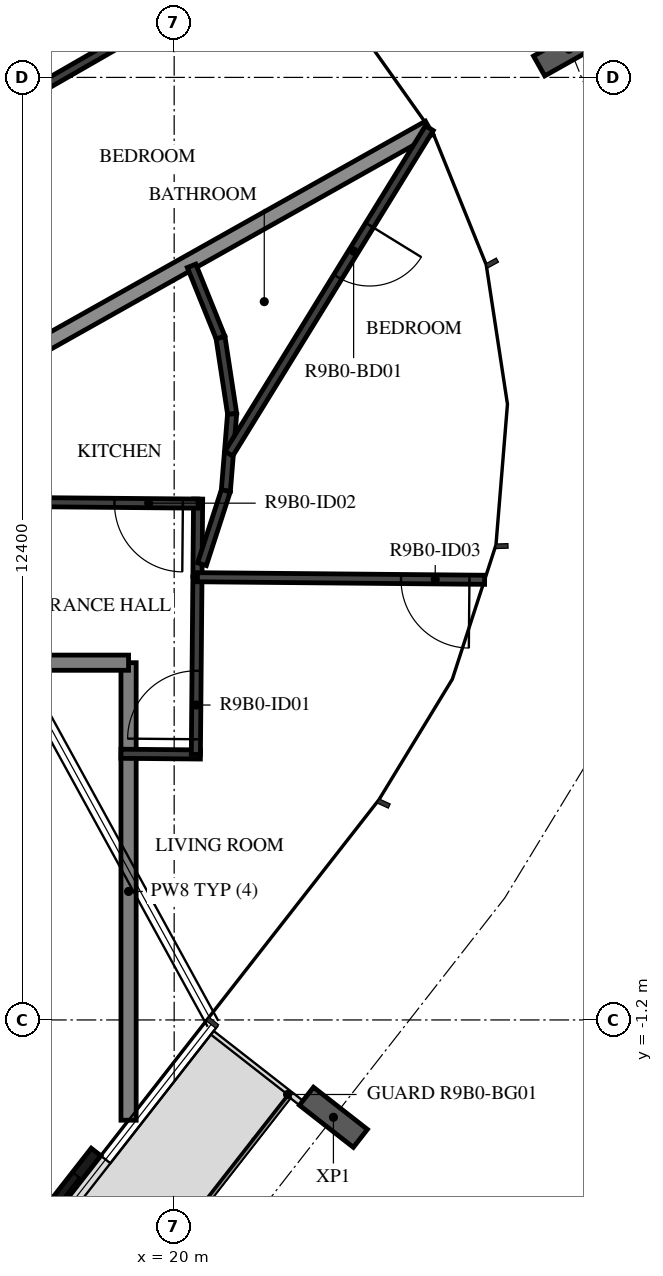
"""IFC4 building model, lengths in metres.
Left out: names, types, materials, properties, quantities, classifications, styles, units other than length and angle.
Written with IfcOpenShell. Run it as: python <this file> out.ifc"""

import sys

from ifc_helpers import new_model, si_unit, direction, frame, frame_2d, origin, origin_2d, place, context, subcontext, project, spatial, rectangle, i_section, extrude, element, fill, save


model = new_model("IFC4")
c1 = context("Model", 3, precision=1e-05, world=origin(), true_north=direction((0.0, 1.0)))
c2 = subcontext(c1, "Body", "Model", "MODEL_VIEW")
j1 = project(units=[si_unit("LENGTHUNIT", "METRE"), si_unit("PLANEANGLEUNIT", "RADIAN")], contexts=[c1])
p1 = place(None, origin())
s1 = spatial("IfcSite", under=j1, at=p1, CompositionType="ELEMENT")
p2 = place(p1, origin())
s2 = spatial("IfcBuilding", under=s1, at=p2, CompositionType="ELEMENT")
p3 = place(p2, frame((0.0, 0.0, 347.0)))
s3 = spatial("IfcBuildingStorey", under=s2, at=p3, CompositionType="ELEMENT", Elevation=347.0)
for number, where, z_axis, x_axis in (
    (1, (22.095, -2.481, -0.38), (0.0, 0.0, 1.0), (-0.616, -0.788, 0.0)),
    (2, (25.194, 11.571, -0.38), (0.0, 0.0, 1.0), (0.49, -0.872, 0.0)),
):
    element("IfcColumn", number, at=place(p3, frame(where, z_axis=z_axis, x_axis=x_axis)), inside=s3, PredefinedType="COLUMN", context=c2, shape_type="SweptSolid", body=[
        extrude(i_section(OverallWidth=0.3, OverallDepth=0.9, WebThickness=0.019, FlangeThickness=0.035, FilletRadius=0.03, at=origin_2d()), origin(), (0.0, 0.0, 1.0), 3.5),
    ])
p4 = place(p3, frame((17.002, -5.459, 0.0), z_axis=(0.0, 0.0, 1.0), x_axis=(0.615666248856, 0.788007024093, 0.0)))
e3 = element("IfcWall", 3, at=p4, inside=s3, PredefinedType="STANDARD", context=c2, shape_type="SweptSolid", body=[
    extrude(rectangle(XDim=3.2, YDim=0.16, at=frame_2d((1.6, 0.0))), origin(), (0.0, 0.0, 1.0), 3.12),
])
p5 = place(p4, frame((0.4, 0.0, 0.0)))
e4 = element("IfcOpeningElement", 4, at=p5, cuts=e3, PredefinedType="OPENING", context=c2, shape_type="SweptSolid", body=[
    extrude(rectangle(XDim=2.4, YDim=2.4, at=frame_2d((1.2, 1.2))), frame((0.0, 0.09, 0.0), z_axis=(0.0, -1.0, 0.0), x_axis=(1.0, 0.0, 0.0)), (0.0, 0.0, 1.0), 0.18),
])
p6 = place(p3, frame((19.4, -2.519, 0.0), z_axis=(0.0, 0.0, 1.0), x_axis=(0.0, 1.0, 0.0)))
e5 = element("IfcWall", 5, at=p6, inside=s3, PredefinedType="STANDARD", context=c2, shape_type="SweptSolid", body=[
    extrude(rectangle(XDim=6.019, YDim=0.2, at=frame_2d((3.01, 0.0))), origin(), (0.0, 0.0, 1.0), 3.12),
])
p7 = place(p3, frame((19.4, 3.5, 0.0), z_axis=(0.0, 0.0, 1.0), x_axis=(-1.0, 0.0, 0.0)))
e6 = element("IfcWall", 6, at=p7, inside=s3, PredefinedType="STANDARD", context=c2, shape_type="SweptSolid", body=[
    extrude(rectangle(XDim=6.362, YDim=0.2, at=frame_2d((3.181, 0.0))), origin(), (0.0, 0.0, 1.0), 3.12),
])
p8 = place(p3, frame((23.354, 10.537, 0.0), z_axis=(0.0, 0.0, 1.0), x_axis=(-0.871719790551, -0.490004700754, 0.0)))
e7 = element("IfcWall", 7, at=p8, inside=s3, PredefinedType="STANDARD", context=c2, shape_type="SweptSolid", body=[
    extrude(rectangle(XDim=6.326, YDim=0.2, at=frame_2d((3.163, 0.0))), origin(), (0.0, 0.0, 1.0), 2.73),
])
p9 = place(p3, frame((19.3, 2.302, 0.0), z_axis=(0.0, 0.0, 1.0), x_axis=(0.999958506341, -0.009109643015, 0.0)))
e8 = element("IfcWall", 8, at=p9, inside=s3, PredefinedType="PARTITIONING", context=c2, shape_type="SweptSolid", body=[
    extrude(rectangle(XDim=1.045, YDim=0.12, at=frame_2d((0.522, 0.0))), origin(), (0.0, 0.0, 1.0), 3.12),
])
p10 = place(p3, frame((20.285, 2.293, 0.0), z_axis=(0.0, 0.0, 1.0), x_axis=(0.008900171034, 0.999960392693, 0.0)))
e9 = element("IfcWall", 9, at=p10, inside=s3, PredefinedType="PARTITIONING", context=c2, shape_type="SweptSolid", body=[
    extrude(rectangle(XDim=2.332, YDim=0.12, at=frame_2d((1.166, 0.0))), origin(), (0.0, 0.0, 1.0), 3.12),
])
p11 = place(p10, frame((0.2, 0.0, 0.0)))
e10 = element("IfcOpeningElement", 10, at=p11, cuts=e9, PredefinedType="OPENING", context=c2, shape_type="SweptSolid", body=[
    extrude(rectangle(XDim=0.9, YDim=2.1, at=frame_2d((0.45, 1.05))), frame((0.0, 0.07, 0.0), z_axis=(0.0, -1.0, 0.0), x_axis=(1.0, 0.0, 0.0)), (0.0, 0.0, 1.0), 0.14),
])
p12 = place(p3, frame((20.306, 4.639, 0.0), z_axis=(0.0, 0.0, 1.0), x_axis=(0.008906724211, 0.999960334345, 0.0)))
e11 = element("IfcWall", 11, at=p12, inside=s3, PredefinedType="PARTITIONING", context=c2, shape_type="SweptSolid", body=[
    extrude(rectangle(XDim=1.014, YDim=0.12, at=frame_2d((0.507, 0.0))), origin(), (0.0, 0.0, 1.0), 3.12),
])
p13 = place(p3, frame((20.315, 5.593, 0.0), z_axis=(0.0, 0.0, 1.0), x_axis=(-0.999960597409, 0.008877140833, 0.0)))
e12 = element("IfcWall", 12, at=p13, inside=s3, PredefinedType="PARTITIONING", context=c2, shape_type="SweptSolid", body=[
    extrude(rectangle(XDim=2.475, YDim=0.12, at=frame_2d((1.238, 0.0))), origin(), (0.0, 0.0, 1.0), 3.12),
])
p14 = place(p13, frame((0.2, 0.0, 0.0)))
e13 = element("IfcOpeningElement", 13, at=p14, cuts=e12, PredefinedType="OPENING", context=c2, shape_type="SweptSolid", body=[
    extrude(rectangle(XDim=0.9, YDim=2.1, at=frame_2d((0.45, 1.05))), frame((0.0, 0.07, 0.0), z_axis=(0.0, -1.0, 0.0), x_axis=(1.0, 0.0, 0.0)), (0.0, 0.0, 1.0), 0.14),
])
p15 = place(p3, frame((24.085, 4.591, 0.0), z_axis=(0.0, 0.0, 1.0), x_axis=(-0.99996025077, 0.008916102255, 0.0)))
e14 = element("IfcWall", 14, at=p15, inside=s3, PredefinedType="PARTITIONING", context=c2, shape_type="SweptSolid", body=[
    extrude(rectangle(XDim=3.779, YDim=0.12, at=frame_2d((1.889, 0.0))), origin(), (0.0, 0.0, 1.0), 2.73),
])
p16 = place(p15, frame((0.2, 0.0, 0.0)))
e15 = element("IfcOpeningElement", 15, at=p16, cuts=e14, PredefinedType="OPENING", context=c2, shape_type="SweptSolid", body=[
    extrude(rectangle(XDim=0.9, YDim=2.1, at=frame_2d((0.45, 1.05))), frame((0.0, 0.07, 0.0), z_axis=(0.0, -1.0, 0.0), x_axis=(1.0, 0.0, 0.0)), (0.0, 0.0, 1.0), 0.14),
])
p17 = place(p3, frame((20.762, 6.775, 0.0), z_axis=(0.0, 0.0, 1.0), x_axis=(-0.08121587, -0.996696534789, 0.0)))
e16 = element("IfcWall", 16, at=p17, inside=s3, PredefinedType="PARTITIONING", context=c2, shape_type="SweptSolid", body=[
    extrude(rectangle(XDim=1.016, YDim=0.12, at=frame_2d((0.508, 0.0))), origin(), (0.0, 0.0, 1.0), 3.12),
])
p18 = place(p3, frame((20.68, 5.762, 0.0), z_axis=(0.0, 0.0, 1.0), x_axis=(-0.30908063779, -0.951035834942, 0.0)))
e17 = element("IfcWall", 17, at=p18, inside=s3, PredefinedType="PARTITIONING", context=c2, shape_type="SweptSolid", body=[
    extrude(rectangle(XDim=1.016, YDim=0.12, at=frame_2d((0.508, 0.0))), origin(), (0.0, 0.0, 1.0), 3.12),
])
p19 = place(p3, frame((23.357, 10.532, 0.0), z_axis=(0.0, 0.0, 1.0), x_axis=(-0.524476563806, -0.851424884542, 0.0)))
e18 = element("IfcWall", 18, at=p19, inside=s3, PredefinedType="PARTITIONING", context=c2, shape_type="SweptSolid", body=[
    extrude(rectangle(XDim=5.029, YDim=0.12, at=frame_2d((2.515, 0.0))), origin(), (0.0, 0.0, 1.0), 3.12),
])
p20 = place(p19, frame((1.5, 0.0, 0.0)))
e19 = element("IfcOpeningElement", 19, at=p20, cuts=e18, PredefinedType="OPENING", context=c2, shape_type="SweptSolid", body=[
    extrude(rectangle(XDim=0.8, YDim=2.1, at=frame_2d((0.4, 1.05))), frame((0.0, 0.07, 0.0), z_axis=(0.0, -1.0, 0.0), x_axis=(1.0, 0.0, 0.0)), (0.0, 0.0, 1.0), 0.14),
])
p21 = place(p3, frame((20.762, 6.775, 0.0), z_axis=(0.0, 0.0, 1.0), x_axis=(-0.150702440861, 0.988579169474, 0.0)))
e20 = element("IfcWall", 20, at=p21, inside=s3, PredefinedType="PARTITIONING", context=c2, shape_type="SweptSolid", body=[
    extrude(rectangle(XDim=1.016, YDim=0.12, at=frame_2d((0.508, 0.0))), origin(), (0.0, 0.0, 1.0), 3.12),
])
p22 = place(p3, frame((20.609, 7.779, 0.0), z_axis=(0.0, 0.0, 1.0), x_axis=(-0.374371668856, 0.927278735633, 0.0)))
e21 = element("IfcWall", 21, at=p22, inside=s3, PredefinedType="PARTITIONING", context=c2, shape_type="SweptSolid", body=[
    extrude(rectangle(XDim=1.016, YDim=0.12, at=frame_2d((0.508, 0.0))), origin(), (0.0, 0.0, 1.0), 3.12),
])
p23 = place(p3, frame((21.343, 12.847, 0.0), z_axis=(0.0, 0.0, 1.0), x_axis=(-0.866974691568, -0.498352168832, 0.0)))
e22 = element("IfcWall", 22, at=p23, inside=s3, PredefinedType="PARTITIONING", context=c2, shape_type="SweptSolid", body=[
    extrude(rectangle(XDim=6.208, YDim=0.12, at=frame_2d((3.104, 0.0))), origin(), (0.0, 0.0, 1.0), 3.12),
])
p24 = place(p3, frame((18.649, 14.244, 0.0), z_axis=(0.0, 0.0, 1.0), x_axis=(-0.513782200586, -0.85792065505, 0.0)))
e23 = element("IfcWall", 23, at=p24, inside=s3, PredefinedType="PARTITIONING", context=c2, shape_type="SweptSolid", body=[
    extrude(rectangle(XDim=5.234, YDim=0.12, at=frame_2d((2.617, 0.0))), origin(), (0.0, 0.0, 1.0), 3.12),
])
p25 = place(p24, frame((0.2, 0.0, 0.0)))
e24 = element("IfcOpeningElement", 24, at=p25, cuts=e23, PredefinedType="OPENING", context=c2, shape_type="SweptSolid", body=[
    extrude(rectangle(XDim=0.8, YDim=2.1, at=frame_2d((0.4, 1.05))), frame((0.0, 0.07, 0.0), z_axis=(0.0, -1.0, 0.0), x_axis=(1.0, 0.0, 0.0)), (0.0, 0.0, 1.0), 0.14),
])
p26 = place(p5, origin())
e25 = element("IfcDoor", 25, at=p26, inside=s3, OperationType="DOUBLE_DOOR_SLIDING", PredefinedType="DOOR", context=c2, shape_type="SweptSolid", body=[
    extrude(rectangle(XDim=2.4, YDim=2.4, at=frame_2d((1.2, 1.2))), frame((0.0, 0.025, 0.0), z_axis=(0.0, -1.0, 0.0), x_axis=(1.0, 0.0, 0.0)), (0.0, 0.0, 1.0), 0.05),
])
fill(e4, e25)
p27 = place(p11, origin())
e26 = element("IfcDoor", 26, at=p27, inside=s3, OperationType="SINGLE_SWING_RIGHT", PredefinedType="DOOR", context=c2, shape_type="SweptSolid", body=[
    extrude(rectangle(XDim=0.9, YDim=2.1, at=frame_2d((0.45, 1.05))), frame((0.0, 0.025, 0.0), z_axis=(0.0, -1.0, 0.0), x_axis=(1.0, 0.0, 0.0)), (0.0, 0.0, 1.0), 0.05),
])
fill(e10, e26)
p28 = place(p14, origin())
e27 = element("IfcDoor", 27, at=p28, inside=s3, OperationType="SINGLE_SWING_RIGHT", PredefinedType="DOOR", context=c2, shape_type="SweptSolid", body=[
    extrude(rectangle(XDim=0.9, YDim=2.1, at=frame_2d((0.45, 1.05))), frame((0.0, 0.025, 0.0), z_axis=(0.0, -1.0, 0.0), x_axis=(1.0, 0.0, 0.0)), (0.0, 0.0, 1.0), 0.05),
])
fill(e13, e27)
p29 = place(p16, origin())
e28 = element("IfcDoor", 28, at=p29, inside=s3, OperationType="SINGLE_SWING_RIGHT", PredefinedType="DOOR", context=c2, shape_type="SweptSolid", body=[
    extrude(rectangle(XDim=0.9, YDim=2.1, at=frame_2d((0.45, 1.05))), frame((0.0, 0.025, 0.0), z_axis=(0.0, -1.0, 0.0), x_axis=(1.0, 0.0, 0.0)), (0.0, 0.0, 1.0), 0.05),
])
fill(e15, e28)
p30 = place(p20, origin())
e29 = element("IfcDoor", 29, at=p30, inside=s3, OperationType="SINGLE_SWING_RIGHT", PredefinedType="DOOR", context=c2, shape_type="SweptSolid", body=[
    extrude(rectangle(XDim=0.8, YDim=2.1, at=frame_2d((0.4, 1.05))), frame((0.0, 0.025, 0.0), z_axis=(0.0, -1.0, 0.0), x_axis=(1.0, 0.0, 0.0)), (0.0, 0.0, 1.0), 0.05),
])
fill(e19, e29)
save(model, sys.argv[1])
